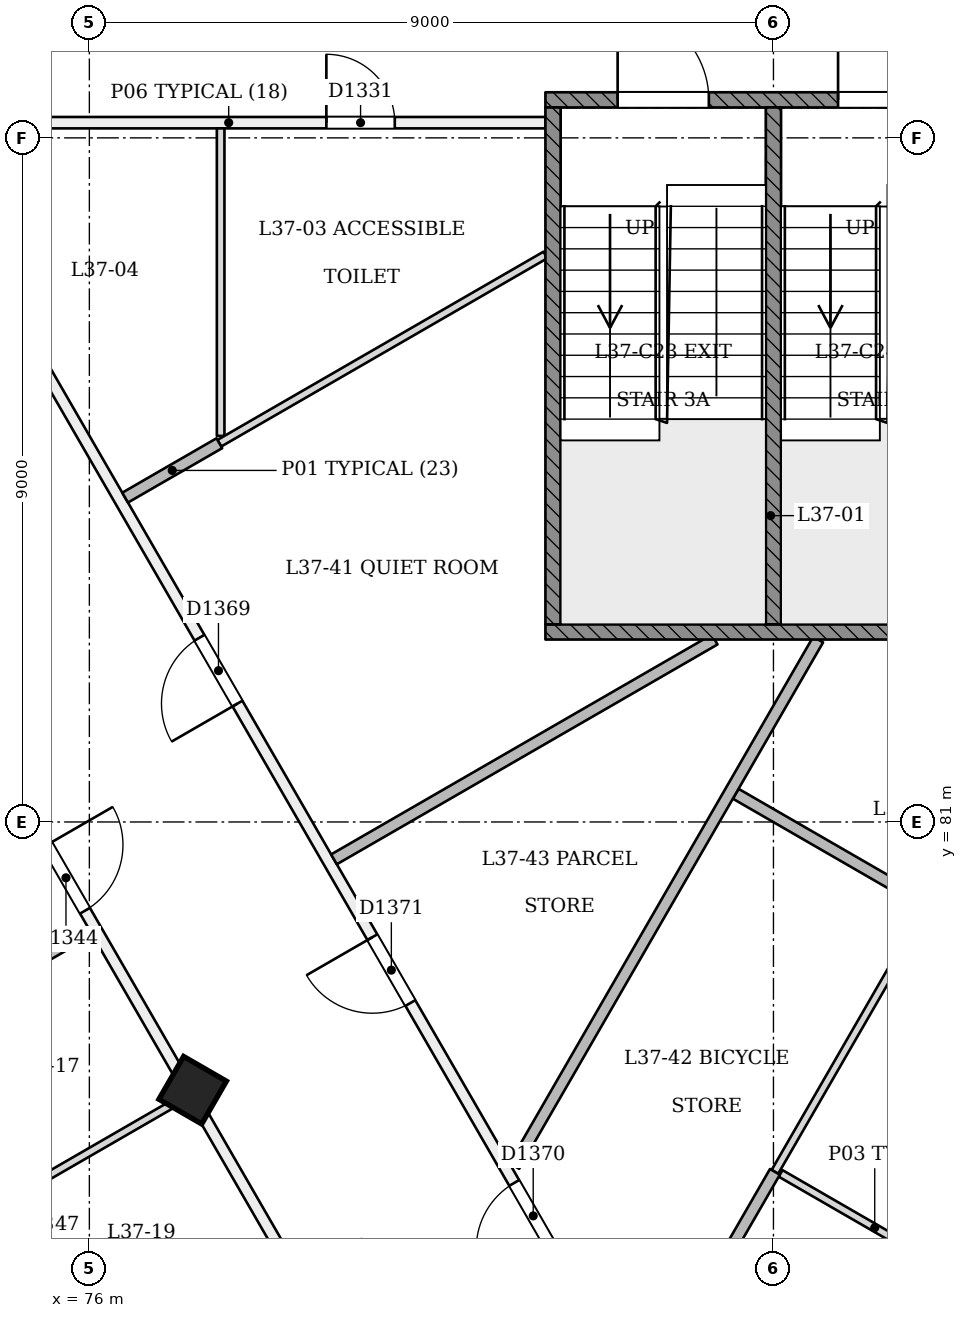
"""IFC4 building model, lengths in metres.
Left out: names, types, materials, properties, quantities, classifications, styles, units other than length and angle.
Written with IfcOpenShell. Run it as: python <this file> out.ifc"""

import sys

from ifc_helpers import new_model, si_unit, direction, frame, frame_2d, origin, origin_2d, place, context, subcontext, project, spatial, rectangle, extrude, element, fill, save


model = new_model("IFC4")
c1 = context("Model", 3, precision=1e-05, world=origin(), true_north=direction((0.0, 1.0)))
c2 = subcontext(c1, "Body", "Model", "MODEL_VIEW")
j1 = project(units=[si_unit("LENGTHUNIT", "METRE"), si_unit("PLANEANGLEUNIT", "RADIAN")], contexts=[c1])
p1 = place(None, origin())
s1 = spatial("IfcSite", under=j1, at=p1, CompositionType="ELEMENT")
p2 = place(p1, origin())
s2 = spatial("IfcBuilding", under=s1, at=p2, CompositionType="ELEMENT")
p3 = place(p2, frame((0.0, 0.0, 145.8)))
s3 = spatial("IfcBuildingStorey", under=s2, at=p3, CompositionType="ELEMENT", Elevation=145.8)
p4 = place(p3, frame((77.332, 77.424, -0.02), z_axis=(0.02222134892, 0.038480872521, 0.999012229206), x_axis=(-0.86564209005, -0.49918218391, 0.038482713007)))
e1 = element("IfcColumn", 1, at=p4, inside=s3, PredefinedType="COLUMN", context=c2, shape_type="SweptSolid", body=[
    extrude(rectangle(XDim=0.65, YDim=0.65, at=origin_2d()), origin(), (0.0, 0.0, 1.0), 3.604),
])
p5 = place(p3, frame((73.666, 90.2, 0.0), z_axis=(0.0, 0.0, 1.0), x_axis=(1.0, 0.0, 0.0)))
e2 = element("IfcWall", 2, at=p5, inside=s3, PredefinedType="PARTITIONING", context=c2, shape_type="SweptSolid", body=[
    extrude(rectangle(XDim=8.334, YDim=0.15, at=frame_2d((4.167, 0.0))), origin(), (0.0, 0.0, 1.0), 3.15),
])
p6 = place(p5, frame((5.452, 0.0, 0.0)))
e3 = element("IfcOpeningElement", 3, at=p6, cuts=e2, PredefinedType="OPENING", context=c2, shape_type="SweptSolid", body=[
    extrude(rectangle(XDim=0.9, YDim=2.1, at=frame_2d((0.45, 1.05))), frame((0.0, 0.085, 0.0), z_axis=(0.0, -1.0, 0.0), x_axis=(1.0, 0.0, 0.0)), (0.0, 0.0, 1.0), 0.171),
])
p7 = place(p3, frame((96.464, 90.2, 0.0), z_axis=(0.0, 0.0, 1.0), x_axis=(-0.50000081944, -0.86602493068, 0.0)))
e4 = element("IfcWall", 4, at=p7, inside=s3, PredefinedType="PARTITIONING", context=c2, shape_type="SweptSolid", body=[
    extrude(rectangle(XDim=22.928, YDim=0.15, at=frame_2d((11.464, 0.0))), origin(), (0.0, 0.0, 1.0), 3.15),
])
p8 = place(p7, frame((15.191, 0.0, 0.0)))
e5 = element("IfcOpeningElement", 5, at=p8, cuts=e4, PredefinedType="OPENING", context=c2, shape_type="SweptSolid", body=[
    extrude(rectangle(XDim=0.9, YDim=2.1, at=frame_2d((0.45, 1.05))), frame((0.0, 0.085, 0.0), z_axis=(0.0, -1.0, 0.0), x_axis=(1.0, 0.0, 0.0)), (0.0, 0.0, 1.0), 0.171),
])
p9 = place(p7, frame((19.386, 0.0, 0.0)))
e6 = element("IfcOpeningElement", 6, at=p9, cuts=e4, PredefinedType="OPENING", context=c2, shape_type="SweptSolid", body=[
    extrude(rectangle(XDim=1.0, YDim=2.1, at=frame_2d((0.5, 1.05))), frame((0.0, 0.085, 0.0), z_axis=(0.0, -1.0, 0.0), x_axis=(1.0, 0.0, 0.0)), (0.0, 0.0, 1.0), 0.171),
])
p10 = place(p7, frame((8.526, 0.0, 0.0)))
e7 = element("IfcOpeningElement", 7, at=p10, cuts=e4, PredefinedType="OPENING", context=c2, shape_type="SweptSolid", body=[
    extrude(rectangle(XDim=1.0, YDim=2.1, at=frame_2d((0.5, 1.05))), frame((0.0, 0.085, 0.0), z_axis=(0.0, -1.0, 0.0), x_axis=(1.0, 0.0, 0.0)), (0.0, 0.0, 1.0), 0.171),
])
p11 = place(p7, frame((11.642, 0.0, 0.0)))
e8 = element("IfcOpeningElement", 8, at=p11, cuts=e4, PredefinedType="OPENING", context=c2, shape_type="SweptSolid", body=[
    extrude(rectangle(XDim=1.0, YDim=2.1, at=frame_2d((0.5, 1.05))), frame((0.0, 0.085, 0.0), z_axis=(0.0, -1.0, 0.0), x_axis=(1.0, 0.0, 0.0)), (0.0, 0.0, 1.0), 0.171),
])
p12 = place(p7, frame((4.409, 0.0, 0.0)))
e9 = element("IfcOpeningElement", 9, at=p12, cuts=e4, PredefinedType="OPENING", context=c2, shape_type="SweptSolid", body=[
    extrude(rectangle(XDim=1.0, YDim=2.1, at=frame_2d((0.5, 1.05))), frame((0.0, 0.085, 0.0), z_axis=(0.0, -1.0, 0.0), x_axis=(1.0, 0.0, 0.0)), (0.0, 0.0, 1.0), 0.171),
])
p13 = place(p3, frame((84.935, 70.457, 0.0), z_axis=(0.0, 0.0, 1.0), x_axis=(-0.50000209693, 0.866024193118, 0.0)))
e10 = element("IfcWall", 10, at=p13, inside=s3, PredefinedType="PARTITIONING", context=c2, shape_type="SweptSolid", body=[
    extrude(rectangle(XDim=22.798, YDim=0.15, at=frame_2d((11.399, 0.0))), origin(), (0.0, 0.0, 1.0), 3.15),
])
p14 = place(p13, frame((19.283, 0.0, 0.0)))
e11 = element("IfcOpeningElement", 11, at=p14, cuts=e10, PredefinedType="OPENING", context=c2, shape_type="SweptSolid", body=[
    extrude(rectangle(XDim=1.0, YDim=2.1, at=frame_2d((0.5, 1.05))), frame((0.0, 0.085, 0.0), z_axis=(0.0, -1.0, 0.0), x_axis=(1.0, 0.0, 0.0)), (0.0, 0.0, 1.0), 0.171),
])
p15 = place(p13, frame((13.973, 0.0, 0.0)))
e12 = element("IfcOpeningElement", 12, at=p15, cuts=e10, PredefinedType="OPENING", context=c2, shape_type="SweptSolid", body=[
    extrude(rectangle(XDim=1.0, YDim=2.1, at=frame_2d((0.5, 1.05))), frame((0.0, 0.085, 0.0), z_axis=(0.0, -1.0, 0.0), x_axis=(1.0, 0.0, 0.0)), (0.0, 0.0, 1.0), 0.171),
])
p16 = place(p13, frame((5.691, 0.0, 0.0)))
e13 = element("IfcOpeningElement", 13, at=p16, cuts=e10, PredefinedType="OPENING", context=c2, shape_type="SweptSolid", body=[
    extrude(rectangle(XDim=1.0, YDim=2.1, at=frame_2d((0.5, 1.05))), frame((0.0, 0.085, 0.0), z_axis=(0.0, -1.0, 0.0), x_axis=(1.0, 0.0, 0.0)), (0.0, 0.0, 1.0), 0.171),
])
p17 = place(p13, frame((9.424, 0.0, 0.0)))
e14 = element("IfcOpeningElement", 14, at=p17, cuts=e10, PredefinedType="OPENING", context=c2, shape_type="SweptSolid", body=[
    extrude(rectangle(XDim=1.0, YDim=2.1, at=frame_2d((0.5, 1.05))), frame((0.0, 0.085, 0.0), z_axis=(0.0, -1.0, 0.0), x_axis=(1.0, 0.0, 0.0)), (0.0, 0.0, 1.0), 0.171),
])
p18 = place(p3, frame((66.082, 96.91, 0.0), z_axis=(0.0, 0.0, 1.0), x_axis=(0.500001949747, -0.866024278094, 0.0)))
e15 = element("IfcWall", 15, at=p18, inside=s3, PredefinedType="PARTITIONING", context=c2, shape_type="SweptSolid", body=[
    extrude(rectangle(XDim=37.705, YDim=0.15, at=frame_2d((18.853, 0.0))), origin(), (0.0, 0.0, 1.0), 2.75),
])
p19 = place(p18, frame((1.75, 0.0, 0.0)))
e16 = element("IfcOpeningElement", 16, at=p19, cuts=e15, PredefinedType="OPENING", context=c2, shape_type="SweptSolid", body=[
    extrude(rectangle(XDim=1.0, YDim=2.1, at=frame_2d((0.5, 1.05))), frame((0.0, 0.085, 0.0), z_axis=(0.0, -1.0, 0.0), x_axis=(1.0, 0.0, 0.0)), (0.0, 0.0, 1.0), 0.171),
])
p20 = place(p18, frame((7.329, 0.0, 0.0)))
e17 = element("IfcOpeningElement", 17, at=p20, cuts=e15, PredefinedType="OPENING", context=c2, shape_type="SweptSolid", body=[
    extrude(rectangle(XDim=1.1, YDim=2.1, at=frame_2d((0.55, 1.05))), frame((0.0, 0.085, 0.0), z_axis=(0.0, -1.0, 0.0), x_axis=(1.0, 0.0, 0.0)), (0.0, 0.0, 1.0), 0.171),
])
p21 = place(p18, frame((9.72, 0.0, 0.0)))
e18 = element("IfcOpeningElement", 18, at=p21, cuts=e15, PredefinedType="OPENING", context=c2, shape_type="SweptSolid", body=[
    extrude(rectangle(XDim=1.0, YDim=2.1, at=frame_2d((0.5, 1.05))), frame((0.0, 0.085, 0.0), z_axis=(0.0, -1.0, 0.0), x_axis=(1.0, 0.0, 0.0)), (0.0, 0.0, 1.0), 0.171),
])
p22 = place(p18, frame((16.28, 0.0, 0.0)))
e19 = element("IfcOpeningElement", 19, at=p22, cuts=e15, PredefinedType="OPENING", context=c2, shape_type="SweptSolid", body=[
    extrude(rectangle(XDim=1.0, YDim=2.1, at=frame_2d((0.5, 1.05))), frame((0.0, 0.085, 0.0), z_axis=(0.0, -1.0, 0.0), x_axis=(1.0, 0.0, 0.0)), (0.0, 0.0, 1.0), 0.171),
])
p23 = place(p18, frame((18.72, 0.0, 0.0)))
e20 = element("IfcOpeningElement", 20, at=p23, cuts=e15, PredefinedType="OPENING", context=c2, shape_type="SweptSolid", body=[
    extrude(rectangle(XDim=1.0, YDim=2.1, at=frame_2d((0.5, 1.05))), frame((0.0, 0.085, 0.0), z_axis=(0.0, -1.0, 0.0), x_axis=(1.0, 0.0, 0.0)), (0.0, 0.0, 1.0), 0.171),
])
p24 = place(p18, frame((25.28, 0.0, 0.0)))
e21 = element("IfcOpeningElement", 21, at=p24, cuts=e15, PredefinedType="OPENING", context=c2, shape_type="SweptSolid", body=[
    extrude(rectangle(XDim=1.0, YDim=2.1, at=frame_2d((0.5, 1.05))), frame((0.0, 0.085, 0.0), z_axis=(0.0, -1.0, 0.0), x_axis=(1.0, 0.0, 0.0)), (0.0, 0.0, 1.0), 0.171),
])
p25 = place(p18, frame((27.72, 0.0, 0.0)))
e22 = element("IfcOpeningElement", 22, at=p25, cuts=e15, PredefinedType="OPENING", context=c2, shape_type="SweptSolid", body=[
    extrude(rectangle(XDim=1.0, YDim=2.1, at=frame_2d((0.5, 1.05))), frame((0.0, 0.085, 0.0), z_axis=(0.0, -1.0, 0.0), x_axis=(1.0, 0.0, 0.0)), (0.0, 0.0, 1.0), 0.171),
])
p26 = place(p18, frame((34.329, 0.0, 0.0)))
e23 = element("IfcOpeningElement", 23, at=p26, cuts=e15, PredefinedType="OPENING", context=c2, shape_type="SweptSolid", body=[
    extrude(rectangle(XDim=1.1, YDim=2.1, at=frame_2d((0.55, 1.05))), frame((0.0, 0.085, 0.0), z_axis=(0.0, -1.0, 0.0), x_axis=(1.0, 0.0, 0.0)), (0.0, 0.0, 1.0), 0.171),
])
p27 = place(p3, frame((85.0, 64.144, 0.0), z_axis=(0.0, 0.0, 1.0), x_axis=(0.50000053273, 0.866025096212, 0.0)))
e24 = element("IfcWall", 24, at=p27, inside=s3, PredefinedType="PARTITIONING", context=c2, shape_type="SweptSolid", body=[
    extrude(rectangle(XDim=39.671, YDim=0.15, at=frame_2d((19.835, 0.0))), origin(), (0.0, 0.0, 1.0), 2.75),
])
p28 = place(p27, frame((0.618, 0.0, 0.0)))
e25 = element("IfcOpeningElement", 25, at=p28, cuts=e24, PredefinedType="OPENING", context=c2, shape_type="SweptSolid", body=[
    extrude(rectangle(XDim=1.2, YDim=2.1, at=frame_2d((0.6, 1.05))), frame((0.0, 0.085, 0.0), z_axis=(0.0, -1.0, 0.0), x_axis=(1.0, 0.0, 0.0)), (0.0, 0.0, 1.0), 0.171),
])
p29 = place(p27, frame((9.115, 0.0, 0.0)))
e26 = element("IfcOpeningElement", 26, at=p29, cuts=e24, PredefinedType="OPENING", context=c2, shape_type="SweptSolid", body=[
    extrude(rectangle(XDim=1.0, YDim=2.1, at=frame_2d((0.5, 1.05))), frame((0.0, 0.085, 0.0), z_axis=(0.0, -1.0, 0.0), x_axis=(1.0, 0.0, 0.0)), (0.0, 0.0, 1.0), 0.171),
])
p30 = place(p27, frame((11.556, 0.0, 0.0)))
e27 = element("IfcOpeningElement", 27, at=p30, cuts=e24, PredefinedType="OPENING", context=c2, shape_type="SweptSolid", body=[
    extrude(rectangle(XDim=1.0, YDim=2.1, at=frame_2d((0.5, 1.05))), frame((0.0, 0.085, 0.0), z_axis=(0.0, -1.0, 0.0), x_axis=(1.0, 0.0, 0.0)), (0.0, 0.0, 1.0), 0.171),
])
p31 = place(p27, frame((18.115, 0.0, 0.0)))
e28 = element("IfcOpeningElement", 28, at=p31, cuts=e24, PredefinedType="OPENING", context=c2, shape_type="SweptSolid", body=[
    extrude(rectangle(XDim=1.0, YDim=2.1, at=frame_2d((0.5, 1.05))), frame((0.0, 0.085, 0.0), z_axis=(0.0, -1.0, 0.0), x_axis=(1.0, 0.0, 0.0)), (0.0, 0.0, 1.0), 0.171),
])
p32 = place(p27, frame((20.556, 0.0, 0.0)))
e29 = element("IfcOpeningElement", 29, at=p32, cuts=e24, PredefinedType="OPENING", context=c2, shape_type="SweptSolid", body=[
    extrude(rectangle(XDim=1.0, YDim=2.1, at=frame_2d((0.5, 1.05))), frame((0.0, 0.085, 0.0), z_axis=(0.0, -1.0, 0.0), x_axis=(1.0, 0.0, 0.0)), (0.0, 0.0, 1.0), 0.171),
])
p33 = place(p27, frame((27.115, 0.0, 0.0)))
e30 = element("IfcOpeningElement", 30, at=p33, cuts=e24, PredefinedType="OPENING", context=c2, shape_type="SweptSolid", body=[
    extrude(rectangle(XDim=1.0, YDim=2.1, at=frame_2d((0.5, 1.05))), frame((0.0, 0.085, 0.0), z_axis=(0.0, -1.0, 0.0), x_axis=(1.0, 0.0, 0.0)), (0.0, 0.0, 1.0), 0.171),
])
p34 = place(p27, frame((30.585, 0.0, 0.0)))
e31 = element("IfcOpeningElement", 31, at=p34, cuts=e24, PredefinedType="OPENING", context=c2, shape_type="SweptSolid", body=[
    extrude(rectangle(XDim=1.0, YDim=2.1, at=frame_2d((0.5, 1.05))), frame((0.0, 0.085, 0.0), z_axis=(0.0, -1.0, 0.0), x_axis=(1.0, 0.0, 0.0)), (0.0, 0.0, 1.0), 0.171),
])
p35 = place(p27, frame((36.164, 0.0, 0.0)))
e32 = element("IfcOpeningElement", 32, at=p35, cuts=e24, PredefinedType="OPENING", context=c2, shape_type="SweptSolid", body=[
    extrude(rectangle(XDim=1.1, YDim=2.1, at=frame_2d((0.55, 1.05))), frame((0.0, 0.085, 0.0), z_axis=(0.0, -1.0, 0.0), x_axis=(1.0, 0.0, 0.0)), (0.0, 0.0, 1.0), 0.171),
])
p36 = place(p27, frame((38.271, 0.0, 0.0)))
e33 = element("IfcOpeningElement", 33, at=p36, cuts=e24, PredefinedType="OPENING", context=c2, shape_type="SweptSolid", body=[
    extrude(rectangle(XDim=1.2, YDim=2.1, at=frame_2d((0.6, 1.05))), frame((0.0, 0.085, 0.0), z_axis=(0.0, -1.0, 0.0), x_axis=(1.0, 0.0, 0.0)), (0.0, 0.0, 1.0), 0.171),
])
p37 = place(p3, frame((85.094, 76.377, 0.0), z_axis=(0.0, 0.0, 1.0), x_axis=(0.866012137121, -0.500022977831, 0.0)))
e34 = element("IfcWall", 34, at=p37, inside=s3, PredefinedType="PARTITIONING", context=c2, shape_type="SweptSolid", body=[
    extrude(rectangle(XDim=2.86, YDim=0.1, at=frame_2d((1.43, 0.0))), origin(), (0.0, 0.0, 1.0), 3.15),
])
p38 = place(p3, frame((87.044, 79.904, 0.0), z_axis=(0.0, 0.0, 1.0), x_axis=(-0.499990325971, -0.866030989016, 0.0)))
e35 = element("IfcWall", 35, at=p38, inside=s3, PredefinedType="PARTITIONING", context=c2, shape_type="SweptSolid", body=[
    extrude(rectangle(XDim=4.05, YDim=0.1, at=frame_2d((2.025, 0.0))), origin(), (0.0, 0.0, 1.0), 3.15),
])
p39 = place(p3, frame((77.727, 90.125, 0.0), z_axis=(0.0, 0.0, 1.0), x_axis=(0.0, -1.0, 0.0)))
e36 = element("IfcWall", 36, at=p39, inside=s3, PredefinedType="PARTITIONING", context=c2, shape_type="SweptSolid", body=[
    extrude(rectangle(XDim=4.046, YDim=0.1, at=frame_2d((2.023, 0.0))), origin(), (0.0, 0.0, 1.0), 3.15),
])
p40 = place(p3, frame((77.71, 85.983, 0.0), z_axis=(0.0, 0.0, 1.0), x_axis=(0.866029649098, 0.49999264683, 0.0)))
e37 = element("IfcWall", 37, at=p40, inside=s3, PredefinedType="PARTITIONING", context=c2, shape_type="SweptSolid", body=[
    extrude(rectangle(XDim=4.954, YDim=0.1, at=frame_2d((2.477, 0.0))), origin(), (0.0, 0.0, 1.0), 3.15),
])
p41 = place(p3, frame((76.471, 85.267, 0.0), z_axis=(0.0, 0.0, 1.0), x_axis=(0.866071942605, 0.499919383734, 0.0)))
e38 = element("IfcWall", 38, at=p41, inside=s3, PredefinedType="PARTITIONING", context=c2, shape_type="SweptSolid", body=[
    extrude(rectangle(XDim=1.431, YDim=0.15, at=frame_2d((0.715, 0.0))), origin(), (0.0, 0.0, 1.0), 3.15),
])
p42 = place(p3, frame((85.019, 76.397, 0.0), z_axis=(0.0, 0.0, 1.0), x_axis=(-0.500026370116, -0.866010178455, 0.0)))
e39 = element("IfcWall", 39, at=p42, inside=s3, PredefinedType="PARTITIONING", context=c2, shape_type="SweptSolid", body=[
    extrude(rectangle(XDim=3.384, YDim=0.15, at=frame_2d((1.692, 0.0))), origin(), (0.0, 0.0, 1.0), 3.15),
])
p43 = place(p3, frame((84.503, 81.371, 0.0), z_axis=(0.0, 0.0, 1.0), x_axis=(0.866042852854, -0.499969776107, 0.0)))
e40 = element("IfcWall", 40, at=p43, inside=s3, PredefinedType="PARTITIONING", context=c2, shape_type="SweptSolid", body=[
    extrude(rectangle(XDim=2.934, YDim=0.15, at=frame_2d((1.467, 0.0))), origin(), (0.0, 0.0, 1.0), 3.15),
])
p44 = place(p3, frame((76.071, 73.81, 0.0), z_axis=(0.0, 0.0, 1.0), x_axis=(-0.500004234368, 0.866022959057, 0.0)))
e41 = element("IfcWall", 41, at=p44, inside=s3, PredefinedType="PARTITIONING", context=c2, shape_type="SweptSolid", body=[
    extrude(rectangle(XDim=5.0, YDim=0.1, at=frame_2d((2.5, 0.0))), origin(), (0.0, 0.0, 1.0), 2.75),
])
p45 = place(p44, frame((3.3, 0.0, 0.0)))
e42 = element("IfcOpeningElement", 42, at=p45, cuts=e41, PredefinedType="OPENING", context=c2, shape_type="SweptSolid", body=[
    extrude(rectangle(XDim=0.9, YDim=2.1, at=frame_2d((0.45, 1.05))), frame((0.0, 0.061, 0.0), z_axis=(0.0, -1.0, 0.0), x_axis=(1.0, 0.0, 0.0)), (0.0, 0.0, 1.0), 0.121),
])
p46 = place(p44, frame((0.8, 0.0, 0.0)))
e43 = element("IfcOpeningElement", 43, at=p46, cuts=e41, PredefinedType="OPENING", context=c2, shape_type="SweptSolid", body=[
    extrude(rectangle(XDim=0.9, YDim=2.1, at=frame_2d((0.45, 1.05))), frame((0.0, 0.061, 0.0), z_axis=(0.0, -1.0, 0.0), x_axis=(1.0, 0.0, 0.0)), (0.0, 0.0, 1.0), 0.121),
])
p47 = place(p3, frame((73.571, 78.14, 0.0), z_axis=(0.0, 0.0, 1.0), x_axis=(0.866011447264, 0.500024172624, 0.0)))
e44 = element("IfcWall", 44, at=p47, inside=s3, PredefinedType="PARTITIONING", context=c2, shape_type="SweptSolid", body=[
    extrude(rectangle(XDim=2.825, YDim=0.1, at=frame_2d((1.413, 0.0))), origin(), (0.0, 0.0, 1.0), 3.15),
])
p48 = place(p3, frame((74.864, 76.0, 0.0), z_axis=(0.0, 0.0, 1.0), x_axis=(0.866042014628, 0.499971228071, 0.0)))
e45 = element("IfcWall", 45, at=p48, inside=s3, PredefinedType="PARTITIONING", context=c2, shape_type="SweptSolid", body=[
    extrude(rectangle(XDim=2.775, YDim=0.1, at=frame_2d((1.388, 0.0))), origin(), (0.0, 0.0, 1.0), 2.75),
])
p49 = place(p3, frame((79.218, 80.508, 0.0), z_axis=(0.0, 0.0, 1.0), x_axis=(0.866031632846, 0.499989210794, 0.0)))
e46 = element("IfcWall", 46, at=p49, inside=s3, PredefinedType="PARTITIONING", context=c2, shape_type="SweptSolid", body=[
    extrude(rectangle(XDim=5.783, YDim=0.15, at=frame_2d((2.892, 0.0))), origin(), (0.0, 0.0, 1.0), 3.15),
])
p50 = place(p3, frame((85.588, 83.4, 0.0), z_axis=(0.0, 0.0, 1.0), x_axis=(-0.500000846469, -0.866024915075, 0.0)))
e47 = element("IfcWall", 47, at=p50, inside=s3, PredefinedType="PARTITIONING", context=c2, shape_type="SweptSolid", body=[
    extrude(rectangle(XDim=7.996, YDim=0.15, at=frame_2d((3.998, 0.0))), origin(), (0.0, 0.0, 1.0), 3.15),
])
p51 = place(p3, frame((82.0, 90.5, 0.0), z_axis=(0.0, 0.0, 1.0), x_axis=(1.0, 0.0, 0.0)))
e48 = element("IfcWall", 48, at=p51, inside=s3, PredefinedType="SOLIDWALL", context=c2, shape_type="SweptSolid", body=[
    extrude(rectangle(XDim=6.0, YDim=0.2, at=frame_2d((3.0, 0.0))), origin(), (0.0, 0.0, 1.0), 3.15),
])
p52 = place(p51, frame((0.95, 0.0, 0.0)))
e49 = element("IfcOpeningElement", 49, at=p52, cuts=e48, PredefinedType="OPENING", context=c2, shape_type="SweptSolid", body=[
    extrude(rectangle(XDim=1.2, YDim=2.1, at=frame_2d((0.6, 1.05))), frame((0.0, 0.11, 0.0), z_axis=(0.0, -1.0, 0.0), x_axis=(1.0, 0.0, 0.0)), (0.0, 0.0, 1.0), 0.221),
])
p53 = place(p51, frame((3.85, 0.0, 0.0)))
e50 = element("IfcOpeningElement", 50, at=p53, cuts=e48, PredefinedType="OPENING", context=c2, shape_type="SweptSolid", body=[
    extrude(rectangle(XDim=1.2, YDim=2.1, at=frame_2d((0.6, 1.05))), frame((0.0, 0.11, 0.0), z_axis=(0.0, -1.0, 0.0), x_axis=(1.0, 0.0, 0.0)), (0.0, 0.0, 1.0), 0.221),
])
p54 = place(p3, frame((82.0, 83.5, 0.0), z_axis=(0.0, 0.0, 1.0), x_axis=(1.0, 0.0, 0.0)))
e51 = element("IfcWall", 51, at=p54, inside=s3, PredefinedType="SOLIDWALL", context=c2, shape_type="SweptSolid", body=[
    extrude(rectangle(XDim=6.0, YDim=0.2, at=frame_2d((3.0, 0.0))), origin(), (0.0, 0.0, 1.0), 3.15),
])
for number, where, z_axis, x_axis in (
    (52, (82.1, 83.6, 0.0), (0.0, 0.0, 1.0), (0.0, 1.0, 0.0)),
    (53, (85.0, 83.6, 0.0), (0.0, 0.0, 1.0), (0.0, 1.0, 0.0)),
):
    element("IfcWall", number, at=place(p3, frame(where, z_axis=z_axis, x_axis=x_axis)), inside=s3, PredefinedType="SOLIDWALL", context=c2, shape_type="SweptSolid", body=[
        extrude(rectangle(XDim=6.8, YDim=0.2, at=frame_2d((3.4, 0.0))), origin(), (0.0, 0.0, 1.0), 3.15),
    ])
p55 = place(p6, origin())
e54 = element("IfcDoor", 54, at=p55, inside=s3, OperationType="SINGLE_SWING_LEFT", PredefinedType="NOTDEFINED", context=c2, shape_type="SweptSolid", body=[
    extrude(rectangle(XDim=0.9, YDim=2.1, at=frame_2d((0.45, 1.05))), frame((0.0, 0.025, 0.0), z_axis=(0.0, -1.0, 0.0), x_axis=(1.0, 0.0, 0.0)), (0.0, 0.0, 1.0), 0.05),
])
fill(e3, e54)
p56 = place(p23, origin())
e55 = element("IfcDoor", 55, at=p56, inside=s3, OperationType="SINGLE_SWING_LEFT", PredefinedType="NOTDEFINED", context=c2, shape_type="SweptSolid", body=[
    extrude(rectangle(XDim=1.0, YDim=2.1, at=frame_2d((0.5, 1.05))), frame((0.0, 0.025, 0.0), z_axis=(0.0, -1.0, 0.0), x_axis=(1.0, 0.0, 0.0)), (0.0, 0.0, 1.0), 0.05),
])
fill(e20, e55)
p57 = place(p15, origin())
e56 = element("IfcDoor", 56, at=p57, inside=s3, OperationType="SINGLE_SWING_LEFT", PredefinedType="NOTDEFINED", context=c2, shape_type="SweptSolid", body=[
    extrude(rectangle(XDim=1.0, YDim=2.1, at=frame_2d((0.5, 1.05))), frame((0.0, 0.025, 0.0), z_axis=(0.0, -1.0, 0.0), x_axis=(1.0, 0.0, 0.0)), (0.0, 0.0, 1.0), 0.05),
])
fill(e12, e56)
p58 = place(p16, origin())
e57 = element("IfcDoor", 57, at=p58, inside=s3, OperationType="SINGLE_SWING_LEFT", PredefinedType="NOTDEFINED", context=c2, shape_type="SweptSolid", body=[
    extrude(rectangle(XDim=1.0, YDim=2.1, at=frame_2d((0.5, 1.05))), frame((0.0, 0.025, 0.0), z_axis=(0.0, -1.0, 0.0), x_axis=(1.0, 0.0, 0.0)), (0.0, 0.0, 1.0), 0.05),
])
fill(e13, e57)
p59 = place(p17, origin())
e58 = element("IfcDoor", 58, at=p59, inside=s3, OperationType="SINGLE_SWING_RIGHT", PredefinedType="NOTDEFINED", context=c2, shape_type="SweptSolid", body=[
    extrude(rectangle(XDim=1.0, YDim=2.1, at=frame_2d((0.5, 1.05))), frame((0.0, 0.025, 0.0), z_axis=(0.0, -1.0, 0.0), x_axis=(1.0, 0.0, 0.0)), (0.0, 0.0, 1.0), 0.05),
])
fill(e14, e58)
p60 = place(p52, origin())
e59 = element("IfcDoor", 59, at=p60, inside=s3, OperationType="SINGLE_SWING_LEFT", PredefinedType="NOTDEFINED", context=c2, shape_type="SweptSolid", body=[
    extrude(rectangle(XDim=1.2, YDim=2.1, at=frame_2d((0.6, 1.05))), frame((0.0, 0.025, 0.0), z_axis=(0.0, -1.0, 0.0), x_axis=(1.0, 0.0, 0.0)), (0.0, 0.0, 1.0), 0.05),
])
fill(e49, e59)
p61 = place(p53, origin())
e60 = element("IfcDoor", 60, at=p61, inside=s3, OperationType="SINGLE_SWING_LEFT", PredefinedType="NOTDEFINED", context=c2, shape_type="SweptSolid", body=[
    extrude(rectangle(XDim=1.2, YDim=2.1, at=frame_2d((0.6, 1.05))), frame((0.0, 0.025, 0.0), z_axis=(0.0, -1.0, 0.0), x_axis=(1.0, 0.0, 0.0)), (0.0, 0.0, 1.0), 0.05),
])
fill(e50, e60)
save(model, sys.argv[1])
